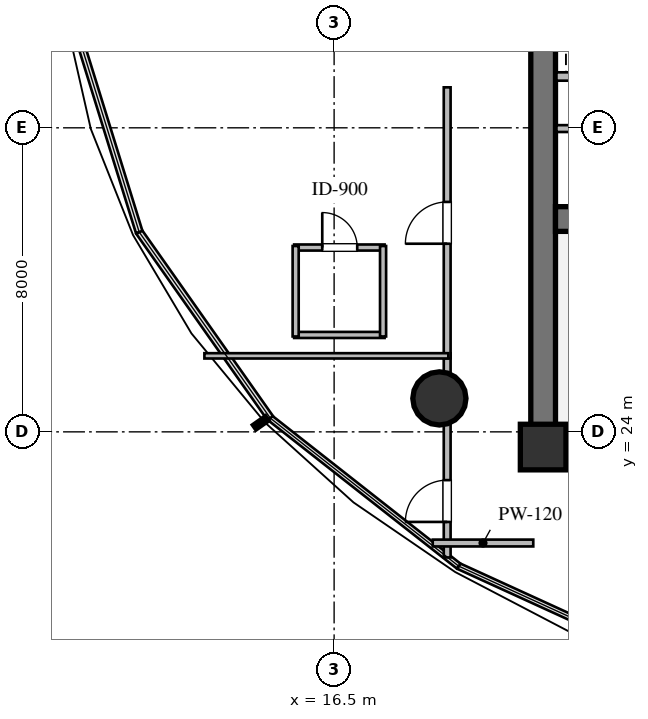
"""IFC4 building model, lengths in metres.
Left out: names, types, materials, properties, quantities, classifications, styles, units other than length and angle.
Written with IfcOpenShell. Run it as: python <this file> out.ifc"""

import sys

from ifc_helpers import new_model, si_unit, direction, frame, frame_2d, origin, origin_2d, place, context, subcontext, project, spatial, rectangle, circle, extrude, element, fill, save


model = new_model("IFC4")
c1 = context("Model", 3, precision=1e-05, world=origin(), true_north=direction((0.0, 1.0)))
c2 = subcontext(c1, "Body", "Model", "MODEL_VIEW")
j1 = project(units=[si_unit("LENGTHUNIT", "METRE"), si_unit("PLANEANGLEUNIT", "RADIAN")], contexts=[c1])
p1 = place(None, origin())
s1 = spatial("IfcSite", under=j1, at=p1, CompositionType="ELEMENT")
p2 = place(p1, origin())
s2 = spatial("IfcBuilding", under=s1, at=p2, CompositionType="ELEMENT")
p3 = place(p2, frame((0.0, 0.0, 27.6)))
s3 = spatial("IfcBuildingStorey", under=s2, at=p3, CompositionType="ELEMENT", Elevation=27.6)
p4 = place(p3, frame((21.675, 23.6, 0.0), z_axis=(0.0, 0.0, 1.0), x_axis=(1.0, 0.0, 0.0)))
e1 = element("IfcWall", 1, at=p4, inside=s3, PredefinedType="SHEAR", context=c2, shape_type="SweptSolid", body=[
    extrude(rectangle(XDim=22.65, YDim=0.65, at=frame_2d((11.325, 0.0))), origin(), (0.0, 0.0, 1.0), 3.36),
])
p5 = place(p3, frame((22.0, 23.925, 0.0), z_axis=(0.0, 0.0, 1.0), x_axis=(0.0, 1.0, 0.0)))
e2 = element("IfcWall", 2, at=p5, inside=s3, PredefinedType="SHEAR", context=c2, shape_type="SweptSolid", body=[
    extrude(rectangle(XDim=12.15, YDim=0.65, at=frame_2d((6.075, 0.0))), origin(), (0.0, 0.0, 1.0), 3.36),
])
p6 = place(p3, frame((22.325, 29.6, 0.0), z_axis=(0.0, 0.0, 1.0), x_axis=(1.0, 0.0, 0.0)))
e3 = element("IfcWall", 3, at=p6, inside=s3, PredefinedType="SHEAR", context=c2, shape_type="SweptSolid", body=[
    extrude(rectangle(XDim=21.35, YDim=0.65, at=frame_2d((10.675, 0.0))), origin(), (0.0, 0.0, 1.0), 3.36),
])
p7 = place(p6, frame((12.125, 0.0, 0.0)))
e4 = element("IfcOpeningElement", 4, at=p7, cuts=e3, PredefinedType="OPENING", context=c2, shape_type="SweptSolid", body=[
    extrude(rectangle(XDim=1.15, YDim=2.1, at=frame_2d((0.575, 1.05))), frame((0.0, 0.335, 0.0), z_axis=(0.0, -1.0, 0.0), x_axis=(1.0, 0.0, 0.0)), (0.0, 0.0, 1.0), 0.67),
])
p8 = place(p3, frame((22.0, 23.6, 0.0), z_axis=(0.0, 0.0, 1.0), x_axis=(1.0, 0.0, 0.0)))
e5 = element("IfcColumn", 5, at=p8, inside=s3, PredefinedType="COLUMN", context=c2, shape_type="SweptSolid", body=[
    extrude(rectangle(XDim=1.2, YDim=1.2, at=origin_2d()), origin(), (0.0, 0.0, 1.0), 3.6),
])
p9 = place(p3, frame((19.27, 24.88, 0.0), z_axis=(0.0, 0.0, 1.0), x_axis=(1.0, 0.0, 0.0)))
e6 = element("IfcColumn", 6, at=p9, inside=s3, PredefinedType="COLUMN", context=c2, shape_type="SweptSolid", body=[
    extrude(circle(Radius=0.7, at=origin_2d()), origin(), (0.0, 0.0, 1.0), 3.6),
])
p10 = place(p3, frame((22.35, 33.35, 0.0), z_axis=(0.0, 0.0, 1.0), x_axis=(1.0, 0.0, 0.0)))
e7 = element("IfcWall", 7, at=p10, inside=s3, PredefinedType="SOLIDWALL", context=c2, shape_type="SweptSolid", body=[
    extrude(rectangle(XDim=3.57, YDim=0.22, at=frame_2d((1.785, 0.0))), origin(), (0.0, 0.0, 1.0), 3.36),
])
p11 = place(p10, frame((2.213, 0.0, 0.0)))
e8 = element("IfcOpeningElement", 8, at=p11, cuts=e7, PredefinedType="OPENING", context=c2, shape_type="SweptSolid", body=[
    extrude(rectangle(XDim=1.2, YDim=2.1, at=frame_2d((0.6, 1.05))), frame((0.0, 0.12, 0.0), z_axis=(0.0, -1.0, 0.0), x_axis=(1.0, 0.0, 0.0)), (0.0, 0.0, 1.0), 0.24),
])
p12 = place(p3, frame((22.35, 31.98, 0.0), z_axis=(0.0, 0.0, 1.0), x_axis=(1.0, 0.0, 0.0)))
e9 = element("IfcWall", 9, at=p12, inside=s3, PredefinedType="PARTITIONING", context=c2, shape_type="SweptSolid", body=[
    extrude(rectangle(XDim=3.75, YDim=0.18, at=frame_2d((1.875, 0.0))), origin(), (0.0, 0.0, 1.0), 3.36),
])
p13 = place(p12, frame((1.425, 0.0, 0.0)))
e10 = element("IfcOpeningElement", 10, at=p13, cuts=e9, PredefinedType="OPENING", context=c2, shape_type="SweptSolid", body=[
    extrude(rectangle(XDim=0.92, YDim=2.1, at=frame_2d((0.46, 1.05))), frame((0.0, 0.1, 0.0), z_axis=(0.0, -1.0, 0.0), x_axis=(1.0, 0.0, 0.0)), (0.0, 0.0, 1.0), 0.2),
])
p14 = place(p3, frame((15.448, 26.55, 0.0), z_axis=(0.0, 0.0, 1.0), x_axis=(1.0, 0.0, 0.0)))
e11 = element("IfcWall", 11, at=p14, inside=s3, PredefinedType="PLUMBINGWALL", context=c2, shape_type="SweptSolid", body=[
    extrude(rectangle(XDim=2.38, YDim=0.16, at=frame_2d((1.19, 0.0))), origin(), (0.0, 0.0, 1.0), 3.36),
])
p15 = place(p3, frame((15.448, 28.85, 0.0), z_axis=(0.0, 0.0, 1.0), x_axis=(1.0, 0.0, 0.0)))
e12 = element("IfcWall", 12, at=p15, inside=s3, PredefinedType="PLUMBINGWALL", context=c2, shape_type="SweptSolid", body=[
    extrude(rectangle(XDim=2.38, YDim=0.16, at=frame_2d((1.19, 0.0))), origin(), (0.0, 0.0, 1.0), 3.36),
])
p16 = place(p15, frame((0.74, 0.0, 0.0)))
e13 = element("IfcOpeningElement", 13, at=p16, cuts=e12, PredefinedType="OPENING", context=c2, shape_type="SweptSolid", body=[
    extrude(rectangle(XDim=0.92, YDim=2.1, at=frame_2d((0.46, 1.05))), frame((0.0, 0.09, 0.0), z_axis=(0.0, -1.0, 0.0), x_axis=(1.0, 0.0, 0.0)), (0.0, 0.0, 1.0), 0.18),
])
p17 = place(p3, frame((15.488, 26.51, 0.0), z_axis=(0.0, 0.0, 1.0), x_axis=(0.0, 1.0, 0.0)))
e14 = element("IfcWall", 14, at=p17, inside=s3, PredefinedType="PLUMBINGWALL", context=c2, shape_type="SweptSolid", body=[
    extrude(rectangle(XDim=2.38, YDim=0.16, at=frame_2d((1.19, 0.0))), origin(), (0.0, 0.0, 1.0), 3.36),
])
p18 = place(p3, frame((17.788, 26.51, 0.0), z_axis=(0.0, 0.0, 1.0), x_axis=(0.0, 1.0, 0.0)))
e15 = element("IfcWall", 15, at=p18, inside=s3, PredefinedType="PLUMBINGWALL", context=c2, shape_type="SweptSolid", body=[
    extrude(rectangle(XDim=2.38, YDim=0.16, at=frame_2d((1.19, 0.0))), origin(), (0.0, 0.0, 1.0), 2.738),
])
p19 = place(p3, frame((19.475, 20.695, 0.0), z_axis=(0.0, 0.0, 1.0), x_axis=(0.0, 1.0, 0.0)))
e16 = element("IfcWall", 16, at=p19, inside=s3, PredefinedType="PARTITIONING", context=c2, shape_type="SweptSolid", body=[
    extrude(rectangle(XDim=5.37, YDim=0.18, at=frame_2d((2.685, 0.0))), origin(), (0.0, 0.0, 1.0), 2.738),
])
p20 = place(p19, frame((0.935, 0.0, 0.0)))
e17 = element("IfcOpeningElement", 17, at=p20, cuts=e16, PredefinedType="OPENING", context=c2, shape_type="SweptSolid", body=[
    extrude(rectangle(XDim=1.1, YDim=2.1, at=frame_2d((0.55, 1.05))), frame((0.0, 0.1, 0.0), z_axis=(0.0, -1.0, 0.0), x_axis=(1.0, 0.0, 0.0)), (0.0, 0.0, 1.0), 0.2),
])
p21 = place(p3, frame((21.74, 21.075, 0.0), z_axis=(0.0, 0.0, 1.0), x_axis=(-1.0, 0.0, 0.0)))
e18 = element("IfcWall", 18, at=p21, inside=s3, PredefinedType="PARTITIONING", context=c2, shape_type="SweptSolid", body=[
    extrude(rectangle(XDim=2.645, YDim=0.18, at=frame_2d((1.323, 0.0))), origin(), (0.0, 0.0, 1.0), 3.36),
])
p22 = place(p3, frame((19.475, 25.935, 0.0), z_axis=(0.0, 0.0, 1.0), x_axis=(0.0, 1.0, 0.0)))
e19 = element("IfcWall", 19, at=p22, inside=s3, PredefinedType="PARTITIONING", context=c2, shape_type="SweptSolid", body=[
    extrude(rectangle(XDim=7.13, YDim=0.18, at=frame_2d((3.565, 0.0))), origin(), (0.0, 0.0, 1.0), 2.738),
])
p23 = place(p22, frame((3.015, 0.0, 0.0)))
e20 = element("IfcOpeningElement", 20, at=p23, cuts=e19, PredefinedType="OPENING", context=c2, shape_type="SweptSolid", body=[
    extrude(rectangle(XDim=1.1, YDim=2.1, at=frame_2d((0.55, 1.05))), frame((0.0, 0.1, 0.0), z_axis=(0.0, -1.0, 0.0), x_axis=(1.0, 0.0, 0.0)), (0.0, 0.0, 1.0), 0.2),
])
p24 = place(p3, frame((13.087, 26.0, 0.0), z_axis=(0.0, 0.0, 1.0), x_axis=(1.0, 0.0, 0.0)))
e21 = element("IfcWall", 21, at=p24, inside=s3, PredefinedType="PARTITIONING", context=c2, shape_type="SweptSolid", body=[
    extrude(rectangle(XDim=6.418, YDim=0.14, at=frame_2d((3.209, 0.0))), origin(), (0.0, 0.0, 1.0), 3.36),
])
p25 = place(p16, origin())
e22 = element("IfcDoor", 22, at=p25, inside=s3, OperationType="SINGLE_SWING_LEFT", PredefinedType="DOOR", context=c2, shape_type="SweptSolid", body=[
    extrude(rectangle(XDim=0.92, YDim=2.1, at=frame_2d((0.46, 1.05))), frame((0.0, 0.025, 0.0), z_axis=(0.0, -1.0, 0.0), x_axis=(1.0, 0.0, 0.0)), (0.0, 0.0, 1.0), 0.05),
])
fill(e13, e22)
p26 = place(p20, origin())
e23 = element("IfcDoor", 23, at=p26, inside=s3, OperationType="SINGLE_SWING_LEFT", PredefinedType="DOOR", context=c2, shape_type="SweptSolid", body=[
    extrude(rectangle(XDim=1.1, YDim=2.1, at=frame_2d((0.55, 1.05))), frame((0.0, 0.025, 0.0), z_axis=(0.0, -1.0, 0.0), x_axis=(1.0, 0.0, 0.0)), (0.0, 0.0, 1.0), 0.05),
])
fill(e17, e23)
p27 = place(p23, origin())
e24 = element("IfcDoor", 24, at=p27, inside=s3, OperationType="SINGLE_SWING_LEFT", PredefinedType="DOOR", context=c2, shape_type="SweptSolid", body=[
    extrude(rectangle(XDim=1.1, YDim=2.1, at=frame_2d((0.55, 1.05))), frame((0.0, 0.025, 0.0), z_axis=(0.0, -1.0, 0.0), x_axis=(1.0, 0.0, 0.0)), (0.0, 0.0, 1.0), 0.05),
])
fill(e20, e24)
save(model, sys.argv[1])
